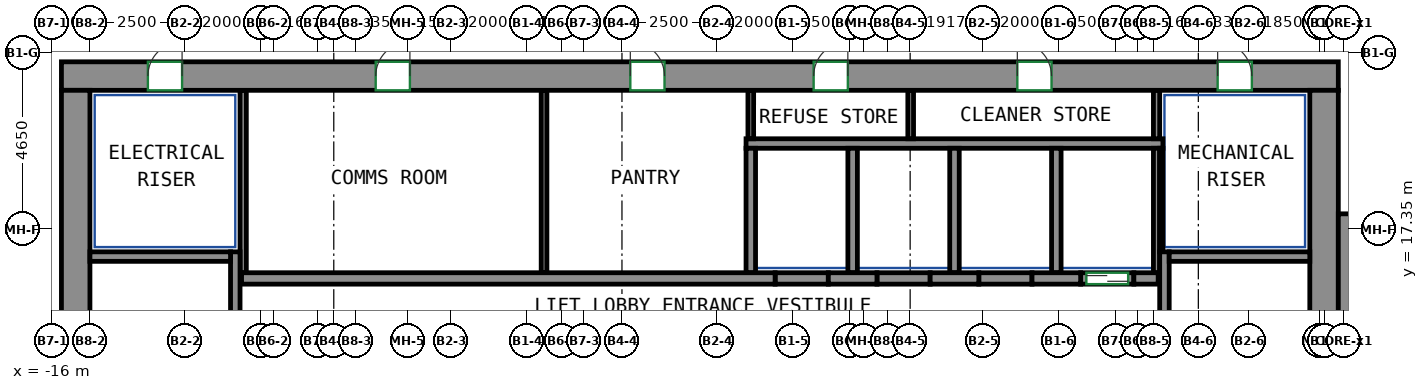
"""IFC4 building model, lengths in metres.
Left out: names, types, materials, properties, quantities, classifications, styles, units other than length and angle.
Written with IfcOpenShell. Run it as: python <this file> out.ifc"""

import sys

from ifc_helpers import new_model, si_unit, direction, frame, frame_2d, origin, place, context, subcontext, project, spatial, rectangle, extrude, source, transform, mapped, element, fill, save


model = new_model("IFC4")
c1 = context("Model", 3, precision=1e-05, world=origin(), true_north=direction((0.0, 1.0)))
c2 = subcontext(c1, "Body", "Model", "MODEL_VIEW")
j1 = project(units=[si_unit("LENGTHUNIT", "METRE"), si_unit("PLANEANGLEUNIT", "RADIAN")], contexts=[c1])
p1 = place(None, origin())
s1 = spatial("IfcSite", under=j1, at=p1, CompositionType="ELEMENT")
p2 = place(p1, origin())
s2 = spatial("IfcBuilding", under=s1, at=p2, CompositionType="ELEMENT")
p3 = place(p2, frame((0.0, 0.0, 188.9)))
s3 = spatial("IfcBuildingStorey", under=s2, at=p3, CompositionType="ELEMENT", Elevation=188.9)
m1 = source(origin(), c2, "Body", "SweptSolid", [
    extrude(rectangle(XDim=33.6, YDim=0.75, at=frame_2d((16.8, 0.0))), origin(), (0.0, 0.0, 1.0), 3.12),
])
p4 = place(p3, frame((-15.75, 21.375, 0.0), z_axis=(0.0, 0.0, 1.0), x_axis=(1.0, 0.0, 0.0)))
e1 = element("IfcWall", 1, at=p4, inside=s3, PredefinedType="SHEAR", context=c2, shape_type="MappedRepresentation", body=[
    mapped(m1, transform((0.0, 0.0, 0.0))),
])
p5 = place(p4, frame((8.27, 0.0, 0.0)))
e2 = element("IfcOpeningElement", 2, at=p5, cuts=e1, PredefinedType="OPENING", context=c2, shape_type="SweptSolid", body=[
    extrude(rectangle(XDim=0.9, YDim=2.1, at=frame_2d((0.45, 1.05))), frame((0.0, 0.385, 0.0), z_axis=(0.0, -1.0, 0.0), x_axis=(1.0, 0.0, 0.0)), (0.0, 0.0, 1.0), 0.77),
])
p6 = place(p4, frame((14.97, 0.0, 0.0)))
e3 = element("IfcOpeningElement", 3, at=p6, cuts=e1, PredefinedType="OPENING", context=c2, shape_type="SweptSolid", body=[
    extrude(rectangle(XDim=0.9, YDim=2.1, at=frame_2d((0.45, 1.05))), frame((0.0, 0.385, 0.0), z_axis=(0.0, -1.0, 0.0), x_axis=(1.0, 0.0, 0.0)), (0.0, 0.0, 1.0), 0.77),
])
p7 = place(p4, frame((19.794, 0.0, 0.0)))
e4 = element("IfcOpeningElement", 4, at=p7, cuts=e1, PredefinedType="OPENING", context=c2, shape_type="SweptSolid", body=[
    extrude(rectangle(XDim=0.9, YDim=2.1, at=frame_2d((0.45, 1.05))), frame((0.0, 0.385, 0.0), z_axis=(0.0, -1.0, 0.0), x_axis=(1.0, 0.0, 0.0)), (0.0, 0.0, 1.0), 0.77),
])
p8 = place(p4, frame((25.154, 0.0, 0.0)))
e5 = element("IfcOpeningElement", 5, at=p8, cuts=e1, PredefinedType="OPENING", context=c2, shape_type="SweptSolid", body=[
    extrude(rectangle(XDim=0.9, YDim=2.1, at=frame_2d((0.45, 1.05))), frame((0.0, 0.385, 0.0), z_axis=(0.0, -1.0, 0.0), x_axis=(1.0, 0.0, 0.0)), (0.0, 0.0, 1.0), 0.77),
])
p9 = place(p4, frame((2.275, 0.0, 0.0)))
e6 = element("IfcOpeningElement", 6, at=p9, cuts=e1, PredefinedType="OPENING", context=c2, shape_type="SweptSolid", body=[
    extrude(rectangle(XDim=0.9, YDim=2.1, at=frame_2d((0.45, 1.05))), frame((0.0, 0.385, 0.0), z_axis=(0.0, -1.0, 0.0), x_axis=(1.0, 0.0, 0.0)), (0.0, 0.0, 1.0), 0.77),
])
p10 = place(p4, frame((30.425, 0.0, 0.0)))
e7 = element("IfcOpeningElement", 7, at=p10, cuts=e1, PredefinedType="OPENING", context=c2, shape_type="SweptSolid", body=[
    extrude(rectangle(XDim=0.9, YDim=2.1, at=frame_2d((0.45, 1.05))), frame((0.0, 0.385, 0.0), z_axis=(0.0, -1.0, 0.0), x_axis=(1.0, 0.0, 0.0)), (0.0, 0.0, 1.0), 0.77),
])
m2 = source(origin(), c2, "Body", "SweptSolid", [
    extrude(rectangle(XDim=12.0, YDim=0.75, at=frame_2d((6.0, 0.0))), origin(), (0.0, 0.0, 1.0), 3.12),
])
for number, where, z_axis, x_axis in (
    (8, (-15.375, 9.0, 0.0), (0.0, 0.0, 1.0), (0.0, 1.0, 0.0)),
    (9, (17.475, 9.0, 0.0), (0.0, 0.0, 1.0), (0.0, 1.0, 0.0)),
):
    element("IfcWall", number, at=place(p3, frame(where, z_axis=z_axis, x_axis=x_axis)), inside=s3, PredefinedType="SHEAR", context=c2, shape_type="MappedRepresentation", body=[
        mapped(m2, transform((0.0, 0.0, 0.0))),
    ])
m3 = source(origin(), c2, "Body", "SweptSolid", [
    extrude(rectangle(XDim=7.75, YDim=0.25, at=frame_2d((3.875, 0.0))), origin(), (0.0, 0.0, 1.0), 3.12),
])
p11 = place(p3, frame((-11.175, 9.0, 0.0), z_axis=(0.0, 0.0, 1.0), x_axis=(0.0, 1.0, 0.0)))
e10 = element("IfcWall", 10, at=p11, inside=s3, PredefinedType="SHEAR", context=c2, shape_type="MappedRepresentation", body=[
    mapped(m3, transform((0.0, 0.0, 0.0))),
])
m4 = source(origin(), c2, "Body", "SweptSolid", [
    extrude(rectangle(XDim=3.7, YDim=0.25, at=frame_2d((1.85, 0.0))), origin(), (0.0, 0.0, 1.0), 3.12),
])
p12 = place(p3, frame((-15.0, 16.625, 0.0), z_axis=(0.0, 0.0, 1.0), x_axis=(1.0, 0.0, 0.0)))
e11 = element("IfcWall", 11, at=p12, inside=s3, PredefinedType="SHEAR", context=c2, shape_type="MappedRepresentation", body=[
    mapped(m4, transform((0.0, 0.0, 0.0))),
])
p13 = place(p3, frame((13.275, 9.0, 0.0), z_axis=(0.0, 0.0, 1.0), x_axis=(0.0, 1.0, 0.0)))
e12 = element("IfcWall", 12, at=p13, inside=s3, PredefinedType="SHEAR", context=c2, shape_type="MappedRepresentation", body=[
    mapped(m3, transform((0.0, 0.0, 0.0))),
])
m5 = source(origin(), c2, "Body", "SweptSolid", [
    extrude(rectangle(XDim=3.7, YDim=0.25, at=frame_2d((1.85, 0.0))), origin(), (0.0, 0.0, 1.0), 3.12),
])
p14 = place(p3, frame((13.4, 16.625, 0.0), z_axis=(0.0, 0.0, 1.0), x_axis=(1.0, 0.0, 0.0)))
e13 = element("IfcWall", 13, at=p14, inside=s3, PredefinedType="SHEAR", context=c2, shape_type="MappedRepresentation", body=[
    mapped(m5, transform((0.0, 0.0, 0.0))),
])
m6 = source(origin(), c2, "Body", "SweptSolid", [
    extrude(rectangle(XDim=8.0, YDim=0.5, at=frame_2d((4.0, 0.0))), origin(), (0.0, 0.0, 1.0), 3.12),
])
p15 = place(p3, frame((18.1, 9.75, 0.0), z_axis=(0.0, 0.0, 1.0), x_axis=(0.0, 1.0, 0.0)))
e14 = element("IfcWall", 14, at=p15, inside=s3, PredefinedType="SHEAR", context=c2, shape_type="MappedRepresentation", body=[
    mapped(m6, transform((0.0, 0.0, 0.0))),
])
m7 = source(origin(), c2, "Body", "SweptSolid", [
    extrude(rectangle(XDim=14.04, YDim=0.3, at=frame_2d((7.02, 0.0))), origin(), (0.0, 0.0, 1.0), 3.12),
])
p16 = place(p3, frame((-11.01, 16.05, 0.0), z_axis=(0.0, 0.0, 1.0), x_axis=(1.0, 0.0, 0.0)))
e15 = element("IfcWall", 15, at=p16, inside=s3, PredefinedType="SHEAR", context=c2, shape_type="MappedRepresentation", body=[
    mapped(m7, transform((0.0, 0.0, 0.0))),
])
m8 = source(origin(), c2, "Body", "SweptSolid", [
    extrude(rectangle(XDim=1.28, YDim=0.3, at=frame_2d((0.64, 0.0))), origin(), (0.0, 0.0, 1.0), 3.12),
])
p17 = place(p3, frame((4.43, 16.05, 0.0), z_axis=(0.0, 0.0, 1.0), x_axis=(1.0, 0.0, 0.0)))
e16 = element("IfcWall", 16, at=p17, inside=s3, PredefinedType="SHEAR", context=c2, shape_type="MappedRepresentation", body=[
    mapped(m8, transform((0.0, 0.0, 0.0))),
])
m9 = source(origin(), c2, "Body", "SweptSolid", [
    extrude(rectangle(XDim=1.28, YDim=0.3, at=frame_2d((0.64, 0.0))), origin(), (0.0, 0.0, 1.0), 3.12),
])
p18 = place(p3, frame((7.11, 16.05, 0.0), z_axis=(0.0, 0.0, 1.0), x_axis=(1.0, 0.0, 0.0)))
e17 = element("IfcWall", 17, at=p18, inside=s3, PredefinedType="SHEAR", context=c2, shape_type="MappedRepresentation", body=[
    mapped(m9, transform((0.0, 0.0, 0.0))),
])
p19 = place(p3, frame((9.79, 16.05, 0.0), z_axis=(0.0, 0.0, 1.0), x_axis=(1.0, 0.0, 0.0)))
e18 = element("IfcWall", 18, at=p19, inside=s3, PredefinedType="SHEAR", context=c2, shape_type="MappedRepresentation", body=[
    mapped(m8, transform((0.0, 0.0, 0.0))),
])
m10 = source(origin(), c2, "Body", "SweptSolid", [
    extrude(rectangle(XDim=0.64, YDim=0.3, at=frame_2d((0.32, 0.0))), origin(), (0.0, 0.0, 1.0), 3.12),
])
p20 = place(p3, frame((12.47, 16.05, 0.0), z_axis=(0.0, 0.0, 1.0), x_axis=(1.0, 0.0, 0.0)))
e19 = element("IfcWall", 19, at=p20, inside=s3, PredefinedType="SHEAR", context=c2, shape_type="MappedRepresentation", body=[
    mapped(m10, transform((0.0, 0.0, 0.0))),
])
m11 = source(origin(), c2, "Body", "SweptSolid", [
    extrude(rectangle(XDim=1.4, YDim=0.3, at=frame_2d((0.7, 0.0))), origin(), (0.0, 0.0, 1.0), 3.12),
])
p21 = place(p3, frame((11.07, 16.05, 0.0), z_axis=(0.0, 0.0, 1.0), x_axis=(1.0, 0.0, 0.0)))
e20 = element("IfcWall", 20, at=p21, inside=s3, PredefinedType="PARTITIONING", context=c2, shape_type="MappedRepresentation", body=[
    mapped(m11, transform((0.0, 0.0, 0.0))),
])
p22 = place(p21, frame((0.15, 0.0, 0.0)))
e21 = element("IfcOpeningElement", 21, at=p22, cuts=e20, PredefinedType="OPENING", context=c2, shape_type="SweptSolid", body=[
    extrude(rectangle(XDim=1.1, YDim=2.1, at=frame_2d((0.55, 1.05))), frame((0.0, 0.16, 0.0), z_axis=(0.0, -1.0, 0.0), x_axis=(1.0, 0.0, 0.0)), (0.0, 0.0, 1.0), 0.32),
])
p23 = place(p3, frame((3.03, 16.05, 0.0), z_axis=(0.0, 0.0, 1.0), x_axis=(1.0, 0.0, 0.0)))
e22 = element("IfcWall", 22, at=p23, inside=s3, PredefinedType="PARTITIONING", context=c2, shape_type="MappedRepresentation", body=[
    mapped(m11, transform((0.0, 0.0, 0.0))),
])
m12 = source(origin(), c2, "Body", "SweptSolid", [
    extrude(rectangle(XDim=1.4, YDim=0.3, at=frame_2d((0.7, 0.0))), origin(), (0.0, 0.0, 1.0), 3.12),
])
for number, where, z_axis, x_axis in (
    (23, (5.71, 16.05, 0.0), (0.0, 0.0, 1.0), (1.0, 0.0, 0.0)),
    (24, (8.39, 16.05, 0.0), (0.0, 0.0, 1.0), (1.0, 0.0, 0.0)),
):
    element("IfcWall", number, at=place(p3, frame(where, z_axis=z_axis, x_axis=x_axis)), inside=s3, PredefinedType="PARTITIONING", context=c2, shape_type="MappedRepresentation", body=[
        mapped(m12, transform((0.0, 0.0, 0.0))),
    ])
m13 = source(origin(), c2, "Body", "SweptSolid", [
    extrude(rectangle(XDim=10.97, YDim=0.25, at=frame_2d((5.485, 0.0))), origin(), (0.0, 0.0, 1.0), 3.12),
])
p24 = place(p3, frame((2.265, 19.6, 0.0), z_axis=(0.0, 0.0, 1.0), x_axis=(1.0, 0.0, 0.0)))
e25 = element("IfcWall", 25, at=p24, inside=s3, PredefinedType="PARTITIONING", context=c2, shape_type="MappedRepresentation", body=[
    mapped(m13, transform((0.0, 0.0, 0.0))),
])
m14 = source(origin(), c2, "Body", "SweptSolid", [
    extrude(rectangle(XDim=3.275, YDim=0.165, at=frame_2d((1.638, 0.0))), origin(), (0.0, 0.0, 1.0), 3.12),
])
p25 = place(p3, frame((13.067, 16.2, 0.0), z_axis=(0.0, 0.0, 1.0), x_axis=(0.0, 1.0, 0.0)))
e26 = element("IfcWall", 26, at=p25, inside=s3, PredefinedType="PARTITIONING", context=c2, shape_type="MappedRepresentation", body=[
    mapped(m14, transform((0.0, 0.0, 0.0))),
])
m15 = source(origin(), c2, "Body", "SweptSolid", [
    extrude(rectangle(XDim=1.275, YDim=0.165, at=frame_2d((0.637, 0.0))), origin(), (0.0, 0.0, 1.0), 3.12),
])
p26 = place(p3, frame((13.067, 19.725, 0.0), z_axis=(0.0, 0.0, 1.0), x_axis=(0.0, 1.0, 0.0)))
e27 = element("IfcWall", 27, at=p26, inside=s3, PredefinedType="PARTITIONING", context=c2, shape_type="MappedRepresentation", body=[
    mapped(m15, transform((0.0, 0.0, 0.0))),
])
m16 = source(origin(), c2, "Body", "SweptSolid", [
    extrude(rectangle(XDim=4.8, YDim=0.165, at=frame_2d((2.4, 0.0))), origin(), (0.0, 0.0, 1.0), 3.12),
])
p27 = place(p3, frame((-10.968, 16.2, 0.0), z_axis=(0.0, 0.0, 1.0), x_axis=(0.0, 1.0, 0.0)))
e28 = element("IfcWall", 28, at=p27, inside=s3, PredefinedType="PARTITIONING", context=c2, shape_type="MappedRepresentation", body=[
    mapped(m16, transform((0.0, 0.0, 0.0))),
])
m17 = source(origin(), c2, "Body", "SweptSolid", [
    extrude(rectangle(XDim=3.275, YDim=0.25, at=frame_2d((1.638, 0.0))), origin(), (0.0, 0.0, 1.0), 3.12),
])
p28 = place(p3, frame((10.43, 16.2, 0.0), z_axis=(0.0, 0.0, 1.0), x_axis=(0.0, 1.0, 0.0)))
e29 = element("IfcWall", 29, at=p28, inside=s3, PredefinedType="PARTITIONING", context=c2, shape_type="MappedRepresentation", body=[
    mapped(m17, transform((0.0, 0.0, 0.0))),
])
m18 = source(origin(), c2, "Body", "SweptSolid", [
    extrude(rectangle(XDim=2.725, YDim=0.085, at=frame_2d((1.363, 0.0))), origin(), (0.0, 0.0, 1.0), 3.12),
])
p29 = place(p3, frame((13.192, 16.75, 0.0), z_axis=(0.0, 0.0, 1.0), x_axis=(0.0, 1.0, 0.0)))
e30 = element("IfcWall", 30, at=p29, inside=s3, PredefinedType="PARTITIONING", context=c2, shape_type="MappedRepresentation", body=[
    mapped(m18, transform((0.0, 0.0, 0.0))),
])
for number, where, z_axis, x_axis in (
    (31, (2.39, 16.2, 0.0), (0.0, 0.0, 1.0), (0.0, 1.0, 0.0)),
    (32, (5.07, 16.2, 0.0), (0.0, 0.0, 1.0), (0.0, 1.0, 0.0)),
    (33, (7.75, 16.2, 0.0), (0.0, 0.0, 1.0), (0.0, 1.0, 0.0)),
):
    element("IfcWall", number, at=place(p3, frame(where, z_axis=z_axis, x_axis=x_axis)), inside=s3, PredefinedType="PARTITIONING", context=c2, shape_type="MappedRepresentation", body=[
        mapped(m17, transform((0.0, 0.0, 0.0))),
    ])
m19 = source(origin(), c2, "Body", "SweptSolid", [
    extrude(rectangle(XDim=4.8, YDim=0.15, at=frame_2d((2.4, 0.0))), origin(), (0.0, 0.0, 1.0), 3.12),
])
p30 = place(p3, frame((-3.05, 16.2, 0.0), z_axis=(0.0, 0.0, 1.0), x_axis=(0.0, 1.0, 0.0)))
e34 = element("IfcWall", 34, at=p30, inside=s3, PredefinedType="PARTITIONING", context=c2, shape_type="MappedRepresentation", body=[
    mapped(m19, transform((0.0, 0.0, 0.0))),
])
m20 = source(origin(), c2, "Body", "SweptSolid", [
    extrude(rectangle(XDim=1.275, YDim=0.15, at=frame_2d((0.637, 0.0))), origin(), (0.0, 0.0, 1.0), 3.12),
])
for number, where, z_axis, x_axis in (
    (35, (2.39, 19.725, 0.0), (0.0, 0.0, 1.0), (0.0, 1.0, 0.0)),
    (36, (6.598, 19.725, 0.0), (0.0, 0.0, 1.0), (0.0, 1.0, 0.0)),
):
    element("IfcWall", number, at=place(p3, frame(where, z_axis=z_axis, x_axis=x_axis)), inside=s3, PredefinedType="PARTITIONING", context=c2, shape_type="MappedRepresentation", body=[
        mapped(m20, transform((0.0, 0.0, 0.0))),
    ])
p31 = place(p22, origin())
e37 = element("IfcDoor", 37, at=p31, inside=s3, OperationType="DOUBLE_DOOR_SLIDING", PredefinedType="DOOR", context=c2, shape_type="SweptSolid", body=[
    extrude(rectangle(XDim=1.1, YDim=2.1, at=frame_2d((0.55, 1.05))), frame((0.0, 0.025, 0.0), z_axis=(0.0, -1.0, 0.0), x_axis=(1.0, 0.0, 0.0)), (0.0, 0.0, 1.0), 0.05),
])
fill(e21, e37)
p32 = place(p5, origin())
e38 = element("IfcDoor", 38, at=p32, inside=s3, OperationType="SINGLE_SWING_RIGHT", PredefinedType="DOOR", context=c2, shape_type="SweptSolid", body=[
    extrude(rectangle(XDim=0.9, YDim=2.1, at=frame_2d((0.45, 1.05))), frame((0.0, -0.23, 0.0), z_axis=(0.0, -1.0, 0.0), x_axis=(1.0, 0.0, 0.0)), (0.0, 0.0, 1.0), 0.05),
])
fill(e2, e38)
p33 = place(p6, origin())
e39 = element("IfcDoor", 39, at=p33, inside=s3, OperationType="SINGLE_SWING_LEFT", PredefinedType="DOOR", context=c2, shape_type="SweptSolid", body=[
    extrude(rectangle(XDim=0.9, YDim=2.1, at=frame_2d((0.45, 1.05))), frame((0.0, -0.23, 0.0), z_axis=(0.0, -1.0, 0.0), x_axis=(1.0, 0.0, 0.0)), (0.0, 0.0, 1.0), 0.05),
])
fill(e3, e39)
p34 = place(p7, origin())
e40 = element("IfcDoor", 40, at=p34, inside=s3, OperationType="SINGLE_SWING_RIGHT", PredefinedType="DOOR", context=c2, shape_type="SweptSolid", body=[
    extrude(rectangle(XDim=0.9, YDim=2.1, at=frame_2d((0.45, 1.05))), frame((0.0, -0.23, 0.0), z_axis=(0.0, -1.0, 0.0), x_axis=(1.0, 0.0, 0.0)), (0.0, 0.0, 1.0), 0.05),
])
fill(e4, e40)
p35 = place(p8, origin())
e41 = element("IfcDoor", 41, at=p35, inside=s3, OperationType="SINGLE_SWING_LEFT", PredefinedType="DOOR", context=c2, shape_type="SweptSolid", body=[
    extrude(rectangle(XDim=0.9, YDim=2.1, at=frame_2d((0.45, 1.05))), frame((0.0, -0.23, 0.0), z_axis=(0.0, -1.0, 0.0), x_axis=(1.0, 0.0, 0.0)), (0.0, 0.0, 1.0), 0.05),
])
fill(e5, e41)
p36 = place(p9, origin())
e42 = element("IfcDoor", 42, at=p36, inside=s3, OperationType="SINGLE_SWING_RIGHT", PredefinedType="DOOR", context=c2, shape_type="SweptSolid", body=[
    extrude(rectangle(XDim=0.9, YDim=2.1, at=frame_2d((0.45, 1.05))), frame((0.0, -0.23, 0.0), z_axis=(0.0, -1.0, 0.0), x_axis=(1.0, 0.0, 0.0)), (0.0, 0.0, 1.0), 0.05),
])
fill(e6, e42)
p37 = place(p10, origin())
e43 = element("IfcDoor", 43, at=p37, inside=s3, OperationType="SINGLE_SWING_LEFT", PredefinedType="DOOR", context=c2, shape_type="SweptSolid", body=[
    extrude(rectangle(XDim=0.9, YDim=2.1, at=frame_2d((0.45, 1.05))), frame((0.0, -0.23, 0.0), z_axis=(0.0, -1.0, 0.0), x_axis=(1.0, 0.0, 0.0)), (0.0, 0.0, 1.0), 0.05),
])
fill(e7, e43)
save(model, sys.argv[1])
